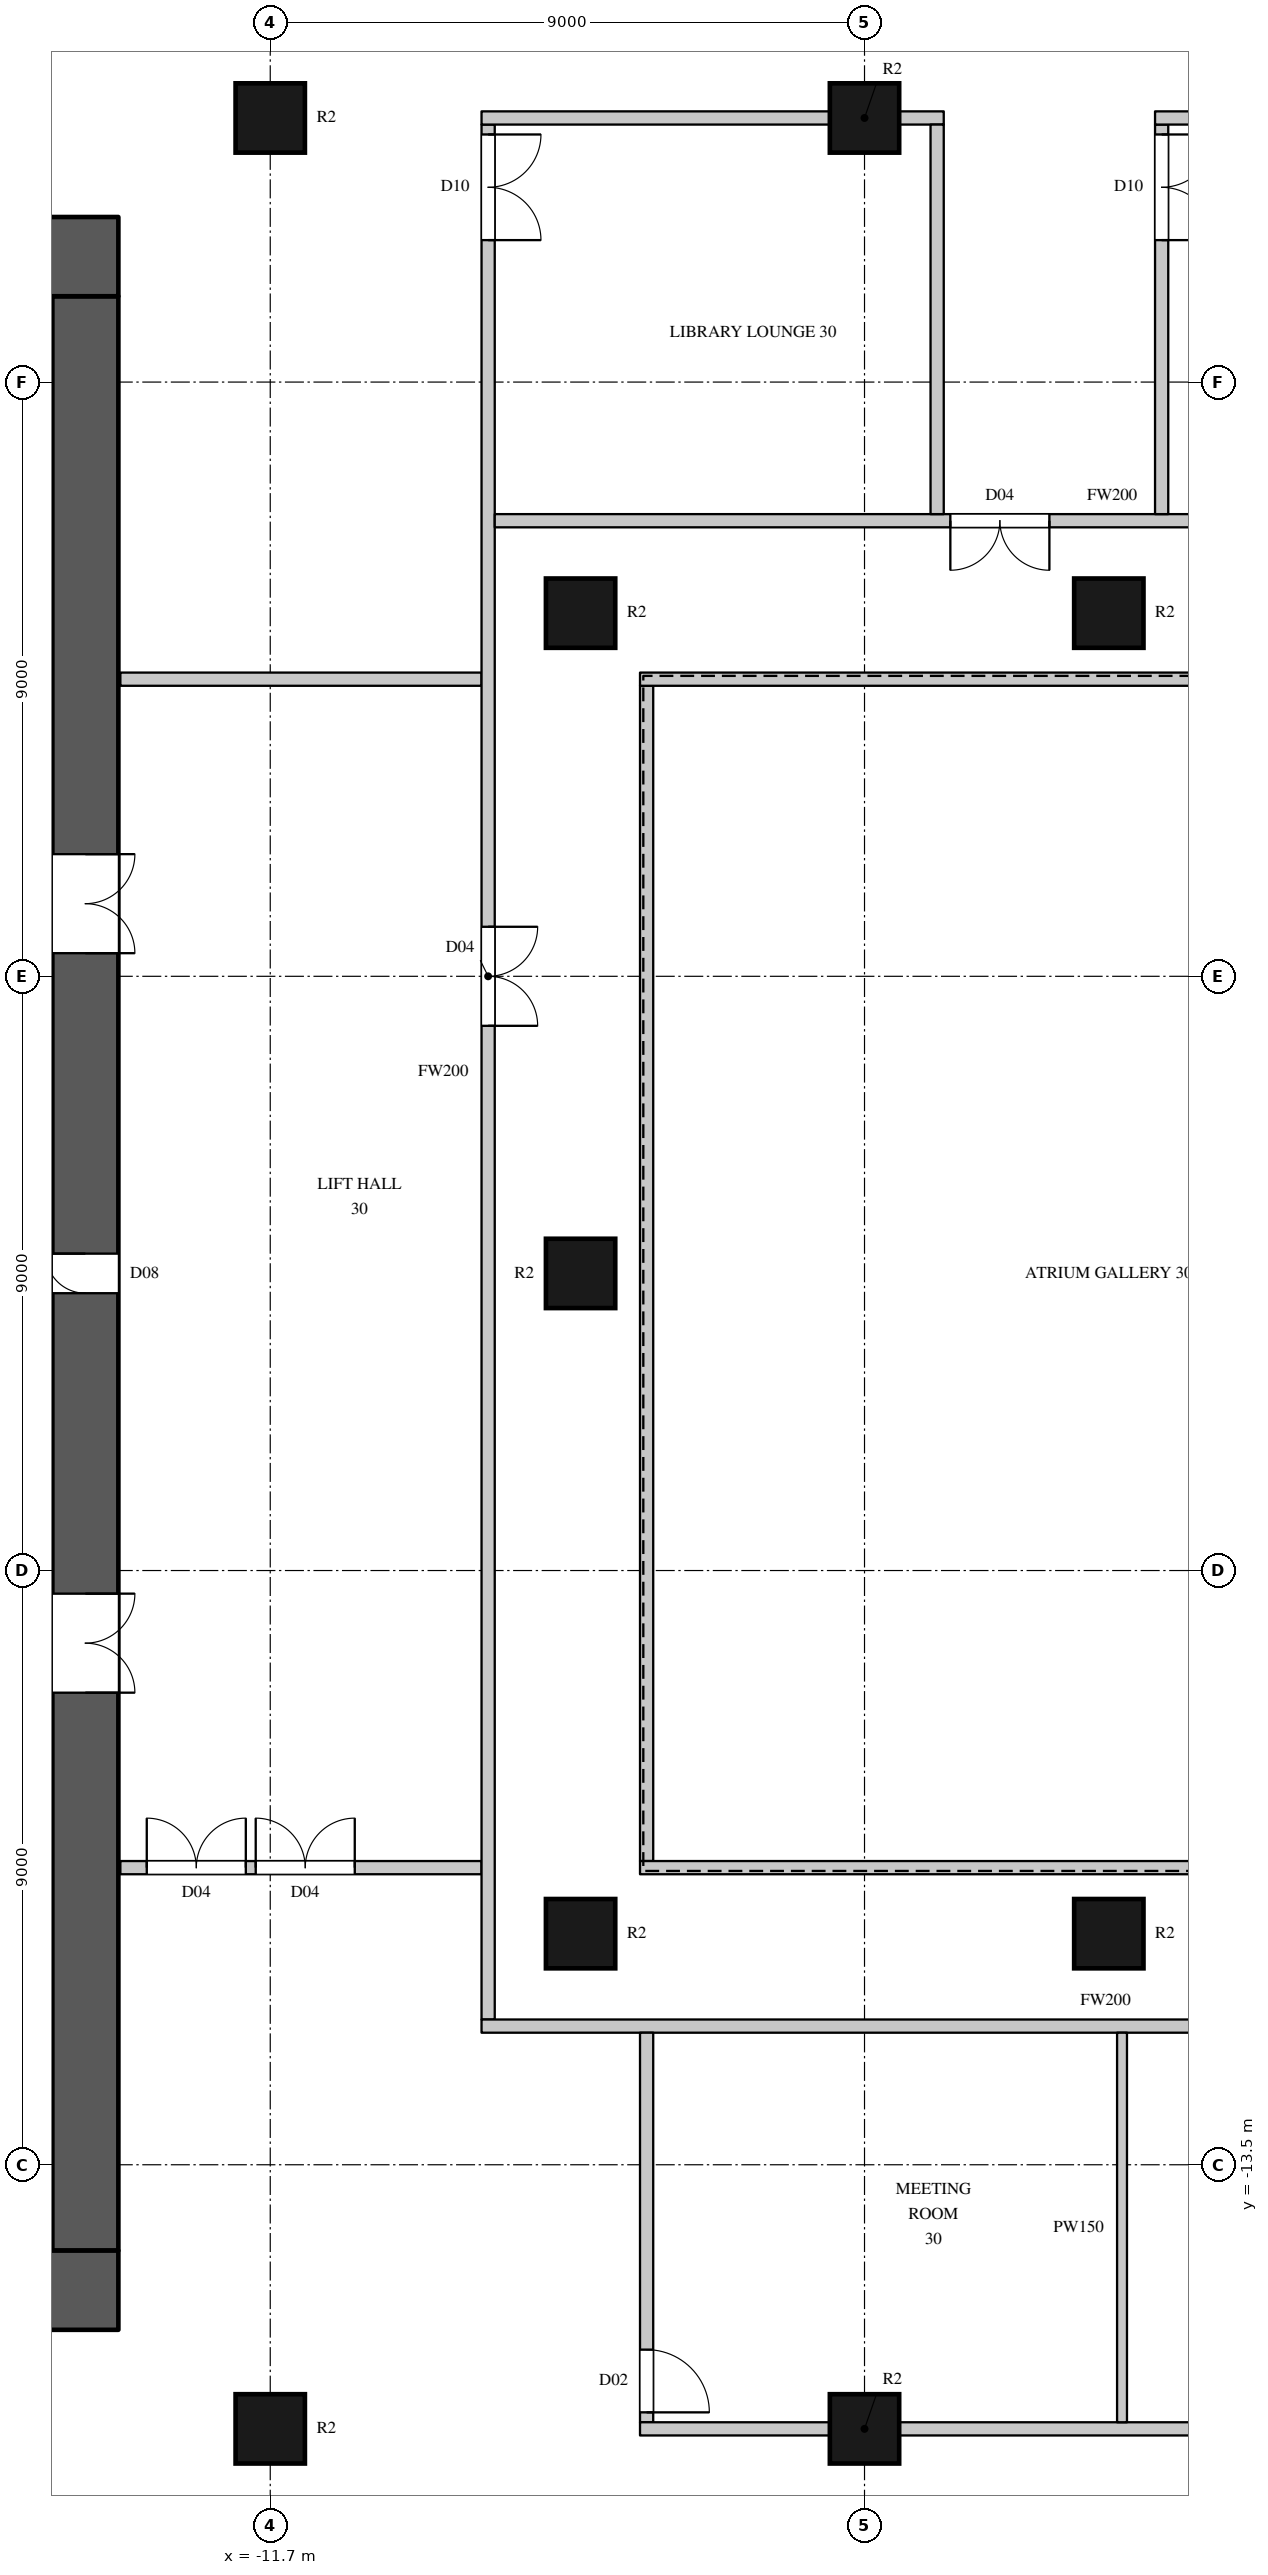
"""IFC4 building model, lengths in metres.
Left out: names, types, materials, properties, quantities, classifications, styles, units other than length and angle.
Written with IfcOpenShell. Run it as: python <this file> out.ifc"""

import sys

from ifc_helpers import new_model, si_unit, direction, frame, frame_2d, origin, origin_2d, place, context, subcontext, project, spatial, rectangle, circle, extrude, element, fill, save


model = new_model("IFC4")
c1 = context("Model", 3, precision=1e-05, world=origin(), true_north=direction((0.0, 1.0)))
c2 = subcontext(c1, "Body", "Model", "MODEL_VIEW")
j1 = project(units=[si_unit("LENGTHUNIT", "METRE"), si_unit("PLANEANGLEUNIT", "RADIAN")], contexts=[c1])
p1 = place(None, origin())
s1 = spatial("IfcSite", under=j1, at=p1, CompositionType="ELEMENT")
p2 = place(p1, origin())
s2 = spatial("IfcBuilding", under=s1, at=p2, CompositionType="ELEMENT")
p3 = place(p2, frame((0.0, 0.0, 138.3)))
s3 = spatial("IfcBuildingStorey", under=s2, at=p3, CompositionType="ELEMENT", Elevation=138.3)
for number, where, z_axis, x_axis in (
    (1, (-11.7, -17.5, 0.0), (0.0, 0.0, 1.0), (1.0, 0.0, 0.0)),
    (2, (-2.7, -17.5, 0.0), (0.0, 0.0, 1.0), (1.0, 0.0, 0.0)),
    (3, (-11.7, 17.5, 0.0), (0.0, 0.0, 1.0), (1.0, 0.0, 0.0)),
    (4, (-2.7, 17.5, 0.0), (0.0, 0.0, 1.0), (1.0, 0.0, 0.0)),
    (5, (-7.0, -10.0, 0.0), (0.0, 0.0, 1.0), (1.0, 0.0, 0.0)),
    (6, (-7.0, 0.0, 0.0), (0.0, 0.0, 1.0), (1.0, 0.0, 0.0)),
    (7, (-7.0, 10.0, 0.0), (0.0, 0.0, 1.0), (1.0, 0.0, 0.0)),
    (8, (1.0, -10.0, 0.0), (0.0, 0.0, 1.0), (1.0, 0.0, 0.0)),
    (9, (1.0, 10.0, 0.0), (0.0, 0.0, 1.0), (1.0, 0.0, 0.0)),
):
    element("IfcColumn", number, at=place(p3, frame(where, z_axis=z_axis, x_axis=x_axis)), inside=s3, PredefinedType="COLUMN", context=c2, shape_type="SweptSolid", body=[
        extrude(circle(Radius=0.525, at=origin_2d()), origin(), (0.0, 0.0, 1.0), 3.6),
    ])
p4 = place(p3, frame((-30.0, 15.4, 0.0), z_axis=(0.0, 0.0, 1.0), x_axis=(1.0, 0.0, 0.0)))
e10 = element("IfcWall", 10, at=p4, inside=s3, PredefinedType="SHEAR", context=c2, shape_type="SweptSolid", body=[
    extrude(rectangle(XDim=16.0, YDim=1.2, at=frame_2d((8.0, 0.0))), origin(), (0.0, 0.0, 1.0), 3.6),
])
p5 = place(p4, frame((13.4, 0.0, 0.0)))
e11 = element("IfcOpeningElement", 11, at=p5, cuts=e10, PredefinedType="OPENING", context=c2, shape_type="SweptSolid", body=[
    extrude(rectangle(XDim=1.5, YDim=2.4, at=frame_2d((0.75, 1.2))), frame((0.0, 0.61, 0.0), z_axis=(0.0, -1.0, 0.0), x_axis=(1.0, 0.0, 0.0)), (0.0, 0.0, 1.0), 1.22),
])
p6 = place(p3, frame((-30.0, -15.4, 0.0), z_axis=(0.0, 0.0, 1.0), x_axis=(1.0, 0.0, 0.0)))
e12 = element("IfcWall", 12, at=p6, inside=s3, PredefinedType="SHEAR", context=c2, shape_type="SweptSolid", body=[
    extrude(rectangle(XDim=16.0, YDim=1.2, at=frame_2d((8.0, 0.0))), origin(), (0.0, 0.0, 1.0), 3.6),
])
p7 = place(p6, frame((13.4, 0.0, 0.0)))
e13 = element("IfcOpeningElement", 13, at=p7, cuts=e12, PredefinedType="OPENING", context=c2, shape_type="SweptSolid", body=[
    extrude(rectangle(XDim=1.5, YDim=2.4, at=frame_2d((0.75, 1.2))), frame((0.0, 0.61, 0.0), z_axis=(0.0, -1.0, 0.0), x_axis=(1.0, 0.0, 0.0)), (0.0, 0.0, 1.0), 1.22),
])
p8 = place(p3, frame((-14.5, -14.8, 0.0), z_axis=(0.0, 0.0, 1.0), x_axis=(0.0, 1.0, 0.0)))
e14 = element("IfcWall", 14, at=p8, inside=s3, PredefinedType="SHEAR", context=c2, shape_type="SweptSolid", body=[
    extrude(rectangle(XDim=29.6, YDim=1.0, at=frame_2d((14.8, 0.0))), origin(), (0.0, 0.0, 1.0), 3.6),
])
p9 = place(p8, frame((8.45, 0.0, 0.0)))
e15 = element("IfcOpeningElement", 15, at=p9, cuts=e14, PredefinedType="OPENING", context=c2, shape_type="SweptSolid", body=[
    extrude(rectangle(XDim=1.5, YDim=2.4, at=frame_2d((0.75, 1.2))), frame((0.0, 0.51, 0.0), z_axis=(0.0, -1.0, 0.0), x_axis=(1.0, 0.0, 0.0)), (0.0, 0.0, 1.0), 1.02),
])
p10 = place(p8, frame((19.65, 0.0, 0.0)))
e16 = element("IfcOpeningElement", 16, at=p10, cuts=e14, PredefinedType="OPENING", context=c2, shape_type="SweptSolid", body=[
    extrude(rectangle(XDim=1.5, YDim=2.4, at=frame_2d((0.75, 1.2))), frame((0.0, 0.51, 0.0), z_axis=(0.0, -1.0, 0.0), x_axis=(1.0, 0.0, 0.0)), (0.0, 0.0, 1.0), 1.02),
])
p11 = place(p8, frame((14.5, 0.0, 0.0)))
e17 = element("IfcOpeningElement", 17, at=p11, cuts=e14, PredefinedType="OPENING", context=c2, shape_type="SweptSolid", body=[
    extrude(rectangle(XDim=0.6, YDim=2.0, at=frame_2d((0.3, 1.0))), frame((0.0, 0.51, 0.0), z_axis=(0.0, -1.0, 0.0), x_axis=(1.0, 0.0, 0.0)), (0.0, 0.0, 1.0), 1.02),
])
p12 = place(p3, frame((-13.97, -9.0, 0.0), z_axis=(0.0, 0.0, 1.0), x_axis=(1.0, 0.0, 0.0)))
e18 = element("IfcWall", 18, at=p12, inside=s3, PredefinedType="PARTITIONING", context=c2, shape_type="SweptSolid", body=[
    extrude(rectangle(XDim=5.47, YDim=0.2, at=frame_2d((2.735, 0.0))), origin(), (0.0, 0.0, 1.0), 3.3),
])
p13 = place(p12, frame((0.4, 0.0, 0.0)))
e19 = element("IfcOpeningElement", 19, at=p13, cuts=e18, PredefinedType="OPENING", context=c2, shape_type="SweptSolid", body=[
    extrude(rectangle(XDim=1.5, YDim=2.2, at=frame_2d((0.75, 1.1))), frame((0.0, 0.11, 0.0), z_axis=(0.0, -1.0, 0.0), x_axis=(1.0, 0.0, 0.0)), (0.0, 0.0, 1.0), 0.22),
])
p14 = place(p12, frame((2.05, 0.0, 0.0)))
e20 = element("IfcOpeningElement", 20, at=p14, cuts=e18, PredefinedType="OPENING", context=c2, shape_type="SweptSolid", body=[
    extrude(rectangle(XDim=1.5, YDim=2.2, at=frame_2d((0.75, 1.1))), frame((0.0, 0.11, 0.0), z_axis=(0.0, -1.0, 0.0), x_axis=(1.0, 0.0, 0.0)), (0.0, 0.0, 1.0), 0.22),
])
p15 = place(p3, frame((-13.97, 9.0, 0.0), z_axis=(0.0, 0.0, 1.0), x_axis=(1.0, 0.0, 0.0)))
e21 = element("IfcWall", 21, at=p15, inside=s3, PredefinedType="PARTITIONING", context=c2, shape_type="SweptSolid", body=[
    extrude(rectangle(XDim=5.47, YDim=0.2, at=frame_2d((2.735, 0.0))), origin(), (0.0, 0.0, 1.0), 3.3),
])
p16 = place(p3, frame((-8.4, -11.3, 0.0), z_axis=(0.0, 0.0, 1.0), x_axis=(0.0, 1.0, 0.0)))
e22 = element("IfcWall", 22, at=p16, inside=s3, PredefinedType="PARTITIONING", context=c2, shape_type="SweptSolid", body=[
    extrude(rectangle(XDim=28.7, YDim=0.2, at=frame_2d((14.35, 0.0))), origin(), (0.0, 0.0, 1.0), 3.3),
])
p17 = place(p16, frame((15.05, 0.0, 0.0)))
e23 = element("IfcOpeningElement", 23, at=p17, cuts=e22, PredefinedType="OPENING", context=c2, shape_type="SweptSolid", body=[
    extrude(rectangle(XDim=1.5, YDim=2.2, at=frame_2d((0.75, 1.1))), frame((0.0, 0.11, 0.0), z_axis=(0.0, -1.0, 0.0), x_axis=(1.0, 0.0, 0.0)), (0.0, 0.0, 1.0), 0.22),
])
p18 = place(p16, frame((26.95, 0.0, 0.0)))
e24 = element("IfcOpeningElement", 24, at=p18, cuts=e22, PredefinedType="OPENING", context=c2, shape_type="SweptSolid", body=[
    extrude(rectangle(XDim=1.6, YDim=2.4, at=frame_2d((0.8, 1.2))), frame((0.0, 0.11, 0.0), z_axis=(0.0, -1.0, 0.0), x_axis=(1.0, 0.0, 0.0)), (0.0, 0.0, 1.0), 0.22),
])
p19 = place(p3, frame((-8.5, -11.4, 0.0), z_axis=(0.0, 0.0, 1.0), x_axis=(1.0, 0.0, 0.0)))
e25 = element("IfcWall", 25, at=p19, inside=s3, PredefinedType="PARTITIONING", context=c2, shape_type="SweptSolid", body=[
    extrude(rectangle(XDim=18.9, YDim=0.2, at=frame_2d((9.45, 0.0))), origin(), (0.0, 0.0, 1.0), 3.3),
])
p20 = place(p3, frame((-8.3, 11.4, 0.0), z_axis=(0.0, 0.0, 1.0), x_axis=(1.0, 0.0, 0.0)))
e26 = element("IfcWall", 26, at=p20, inside=s3, PredefinedType="PARTITIONING", context=c2, shape_type="SweptSolid", body=[
    extrude(rectangle(XDim=18.7, YDim=0.2, at=frame_2d((9.35, 0.0))), origin(), (0.0, 0.0, 1.0), 3.3),
])
p21 = place(p20, frame((6.9, 0.0, 0.0)))
e27 = element("IfcOpeningElement", 27, at=p21, cuts=e26, PredefinedType="OPENING", context=c2, shape_type="SweptSolid", body=[
    extrude(rectangle(XDim=1.5, YDim=2.2, at=frame_2d((0.75, 1.1))), frame((0.0, 0.11, 0.0), z_axis=(0.0, -1.0, 0.0), x_axis=(1.0, 0.0, 0.0)), (0.0, 0.0, 1.0), 0.22),
])
p22 = place(p3, frame((-8.5, 17.5, 0.0), z_axis=(0.0, 0.0, 1.0), x_axis=(1.0, 0.0, 0.0)))
e28 = element("IfcWall", 28, at=p22, inside=s3, PredefinedType="PARTITIONING", context=c2, shape_type="SweptSolid", body=[
    extrude(rectangle(XDim=5.275, YDim=0.2, at=frame_2d((2.637, 0.0))), origin(), (0.0, 0.0, 1.0), 2.75),
])
p23 = place(p3, frame((-2.175, 17.5, 0.0), z_axis=(0.0, 0.0, 1.0), x_axis=(1.0, 0.0, 0.0)))
e29 = element("IfcWall", 29, at=p23, inside=s3, PredefinedType="PARTITIONING", context=c2, shape_type="SweptSolid", body=[
    extrude(rectangle(XDim=0.675, YDim=0.2, at=frame_2d((0.337, 0.0))), origin(), (0.0, 0.0, 1.0), 2.75),
])
p24 = place(p3, frame((-6.0, -17.4, 0.0), z_axis=(0.0, 0.0, 1.0), x_axis=(0.0, 1.0, 0.0)))
e30 = element("IfcWall", 30, at=p24, inside=s3, PredefinedType="PARTITIONING", context=c2, shape_type="SweptSolid", body=[
    extrude(rectangle(XDim=5.9, YDim=0.2, at=frame_2d((2.95, 0.0))), origin(), (0.0, 0.0, 1.0), 3.3),
])
p25 = place(p24, frame((0.15, 0.0, 0.0)))
e31 = element("IfcOpeningElement", 31, at=p25, cuts=e30, PredefinedType="OPENING", context=c2, shape_type="SweptSolid", body=[
    extrude(rectangle(XDim=0.95, YDim=2.2, at=frame_2d((0.475, 1.1))), frame((0.0, 0.11, 0.0), z_axis=(0.0, -1.0, 0.0), x_axis=(1.0, 0.0, 0.0)), (0.0, 0.0, 1.0), 0.22),
])
p26 = place(p3, frame((-6.1, -17.5, 0.0), z_axis=(0.0, 0.0, 1.0), x_axis=(1.0, 0.0, 0.0)))
e32 = element("IfcWall", 32, at=p26, inside=s3, PredefinedType="PARTITIONING", context=c2, shape_type="SweptSolid", body=[
    extrude(rectangle(XDim=2.875, YDim=0.2, at=frame_2d((1.438, 0.0))), origin(), (0.0, 0.0, 1.0), 2.75),
])
p27 = place(p3, frame((-2.175, -17.5, 0.0), z_axis=(0.0, 0.0, 1.0), x_axis=(1.0, 0.0, 0.0)))
e33 = element("IfcWall", 33, at=p27, inside=s3, PredefinedType="PARTITIONING", context=c2, shape_type="SweptSolid", body=[
    extrude(rectangle(XDim=7.95, YDim=0.2, at=frame_2d((3.975, 0.0))), origin(), (0.0, 0.0, 1.0), 2.75),
])
p28 = place(p27, frame((5.0, 0.0, 0.0)))
e34 = element("IfcOpeningElement", 34, at=p28, cuts=e33, PredefinedType="OPENING", context=c2, shape_type="SweptSolid", body=[
    extrude(rectangle(XDim=0.95, YDim=2.2, at=frame_2d((0.475, 1.1))), frame((0.0, 0.11, 0.0), z_axis=(0.0, -1.0, 0.0), x_axis=(1.0, 0.0, 0.0)), (0.0, 0.0, 1.0), 0.22),
])
p29 = place(p3, frame((-6.0, -8.9, 0.0), z_axis=(0.0, 0.0, 1.0), x_axis=(0.0, 1.0, 0.0)))
e35 = element("IfcWall", 35, at=p29, inside=s3, PredefinedType="PARTITIONING", context=c2, shape_type="SweptSolid", body=[
    extrude(rectangle(XDim=17.8, YDim=0.2, at=frame_2d((8.9, 0.0))), origin(), (0.0, 0.0, 1.0), 3.3),
])
for number, where, z_axis, x_axis in (
    (36, (-6.1, -9.0, 0.0), (0.0, 0.0, 1.0), (1.0, 0.0, 0.0)),
    (37, (-6.1, 9.0, 0.0), (0.0, 0.0, 1.0), (1.0, 0.0, 0.0)),
):
    element("IfcWall", number, at=place(p3, frame(where, z_axis=z_axis, x_axis=x_axis)), inside=s3, PredefinedType="PARTITIONING", context=c2, shape_type="SweptSolid", body=[
        extrude(rectangle(XDim=14.2, YDim=0.2, at=frame_2d((7.1, 0.0))), origin(), (0.0, 0.0, 1.0), 3.3),
    ])
p30 = place(p3, frame((-1.6, 11.5, 0.0), z_axis=(0.0, 0.0, 1.0), x_axis=(0.0, 1.0, 0.0)))
e38 = element("IfcWall", 38, at=p30, inside=s3, PredefinedType="PARTITIONING", context=c2, shape_type="SweptSolid", body=[
    extrude(rectangle(XDim=5.9, YDim=0.2, at=frame_2d((2.95, 0.0))), origin(), (0.0, 0.0, 1.0), 3.3),
])
p31 = place(p3, frame((1.8, 11.5, 0.0), z_axis=(0.0, 0.0, 1.0), x_axis=(0.0, 1.0, 0.0)))
e39 = element("IfcWall", 39, at=p31, inside=s3, PredefinedType="PARTITIONING", context=c2, shape_type="SweptSolid", body=[
    extrude(rectangle(XDim=5.9, YDim=0.2, at=frame_2d((2.95, 0.0))), origin(), (0.0, 0.0, 1.0), 3.3),
])
p32 = place(p31, frame((4.15, 0.0, 0.0)))
e40 = element("IfcOpeningElement", 40, at=p32, cuts=e39, PredefinedType="OPENING", context=c2, shape_type="SweptSolid", body=[
    extrude(rectangle(XDim=1.6, YDim=2.4, at=frame_2d((0.8, 1.2))), frame((0.0, 0.11, 0.0), z_axis=(0.0, -1.0, 0.0), x_axis=(1.0, 0.0, 0.0)), (0.0, 0.0, 1.0), 0.22),
])
p33 = place(p3, frame((1.7, 17.5, 0.0), z_axis=(0.0, 0.0, 1.0), x_axis=(1.0, 0.0, 0.0)))
e41 = element("IfcWall", 41, at=p33, inside=s3, PredefinedType="PARTITIONING", context=c2, shape_type="SweptSolid", body=[
    extrude(rectangle(XDim=4.075, YDim=0.2, at=frame_2d((2.038, 0.0))), origin(), (0.0, 0.0, 1.0), 2.75),
])
p34 = place(p3, frame((1.2, -17.4, 0.0), z_axis=(0.0, 0.0, 1.0), x_axis=(0.0, 1.0, 0.0)))
e42 = element("IfcWall", 42, at=p34, inside=s3, PredefinedType="PARTITIONING", context=c2, shape_type="SweptSolid", body=[
    extrude(rectangle(XDim=5.9, YDim=0.15, at=frame_2d((2.95, 0.0))), origin(), (0.0, 0.0, 1.0), 3.3),
])
p35 = place(p17, origin())
e43 = element("IfcDoor", 43, at=p35, inside=s3, OperationType="DOUBLE_DOOR_SINGLE_SWING", PredefinedType="DOOR", context=c2, shape_type="SweptSolid", body=[
    extrude(rectangle(XDim=1.5, YDim=2.2, at=frame_2d((0.75, 1.1))), frame((0.0, 0.025, 0.0), z_axis=(0.0, -1.0, 0.0), x_axis=(1.0, 0.0, 0.0)), (0.0, 0.0, 1.0), 0.05),
])
fill(e23, e43)
p36 = place(p13, origin())
e44 = element("IfcDoor", 44, at=p36, inside=s3, OperationType="DOUBLE_DOOR_SINGLE_SWING", PredefinedType="DOOR", context=c2, shape_type="SweptSolid", body=[
    extrude(rectangle(XDim=1.5, YDim=2.2, at=frame_2d((0.75, 1.1))), frame((0.0, 0.025, 0.0), z_axis=(0.0, -1.0, 0.0), x_axis=(1.0, 0.0, 0.0)), (0.0, 0.0, 1.0), 0.05),
])
fill(e19, e44)
p37 = place(p14, origin())
e45 = element("IfcDoor", 45, at=p37, inside=s3, OperationType="DOUBLE_DOOR_SINGLE_SWING", PredefinedType="DOOR", context=c2, shape_type="SweptSolid", body=[
    extrude(rectangle(XDim=1.5, YDim=2.2, at=frame_2d((0.75, 1.1))), frame((0.0, 0.025, 0.0), z_axis=(0.0, -1.0, 0.0), x_axis=(1.0, 0.0, 0.0)), (0.0, 0.0, 1.0), 0.05),
])
fill(e20, e45)
p38 = place(p21, origin())
e46 = element("IfcDoor", 46, at=p38, inside=s3, OperationType="DOUBLE_DOOR_SINGLE_SWING", PredefinedType="DOOR", context=c2, shape_type="SweptSolid", body=[
    extrude(rectangle(XDim=1.5, YDim=2.2, at=frame_2d((0.75, 1.1))), frame((0.0, 0.025, 0.0), z_axis=(0.0, -1.0, 0.0), x_axis=(1.0, 0.0, 0.0)), (0.0, 0.0, 1.0), 0.05),
])
fill(e27, e46)
p39 = place(p18, origin())
e47 = element("IfcDoor", 47, at=p39, inside=s3, OperationType="DOUBLE_DOOR_SINGLE_SWING", PredefinedType="DOOR", context=c2, shape_type="SweptSolid", body=[
    extrude(rectangle(XDim=1.6, YDim=2.4, at=frame_2d((0.8, 1.2))), frame((0.0, 0.025, 0.0), z_axis=(0.0, -1.0, 0.0), x_axis=(1.0, 0.0, 0.0)), (0.0, 0.0, 1.0), 0.05),
])
fill(e24, e47)
p40 = place(p32, origin())
e48 = element("IfcDoor", 48, at=p40, inside=s3, OperationType="DOUBLE_DOOR_SINGLE_SWING", PredefinedType="DOOR", context=c2, shape_type="SweptSolid", body=[
    extrude(rectangle(XDim=1.6, YDim=2.4, at=frame_2d((0.8, 1.2))), frame((0.0, 0.025, 0.0), z_axis=(0.0, -1.0, 0.0), x_axis=(1.0, 0.0, 0.0)), (0.0, 0.0, 1.0), 0.05),
])
fill(e40, e48)
p41 = place(p25, origin())
e49 = element("IfcDoor", 49, at=p41, inside=s3, OperationType="SINGLE_SWING_RIGHT", PredefinedType="DOOR", context=c2, shape_type="SweptSolid", body=[
    extrude(rectangle(XDim=0.95, YDim=2.2, at=frame_2d((0.475, 1.1))), frame((0.0, 0.025, 0.0), z_axis=(0.0, -1.0, 0.0), x_axis=(1.0, 0.0, 0.0)), (0.0, 0.0, 1.0), 0.05),
])
fill(e31, e49)
p42 = place(p9, origin())
e50 = element("IfcDoor", 50, at=p42, inside=s3, OperationType="DOUBLE_DOOR_SINGLE_SWING", PredefinedType="DOOR", context=c2, shape_type="SweptSolid", body=[
    extrude(rectangle(XDim=1.5, YDim=2.4, at=frame_2d((0.75, 1.2))), frame((0.0, -0.445, 0.0), z_axis=(0.0, -1.0, 0.0), x_axis=(1.0, 0.0, 0.0)), (0.0, 0.0, 1.0), 0.05),
])
fill(e15, e50)
p43 = place(p10, origin())
e51 = element("IfcDoor", 51, at=p43, inside=s3, OperationType="DOUBLE_DOOR_SINGLE_SWING", PredefinedType="DOOR", context=c2, shape_type="SweptSolid", body=[
    extrude(rectangle(XDim=1.5, YDim=2.4, at=frame_2d((0.75, 1.2))), frame((0.0, -0.445, 0.0), z_axis=(0.0, -1.0, 0.0), x_axis=(1.0, 0.0, 0.0)), (0.0, 0.0, 1.0), 0.05),
])
fill(e16, e51)
p44 = place(p11, origin())
e52 = element("IfcDoor", 52, at=p44, inside=s3, OperationType="SINGLE_SWING_RIGHT", PredefinedType="DOOR", context=c2, shape_type="SweptSolid", body=[
    extrude(rectangle(XDim=0.6, YDim=2.0, at=frame_2d((0.3, 1.0))), frame((0.0, 0.495, 0.0), z_axis=(0.0, -1.0, 0.0), x_axis=(1.0, 0.0, 0.0)), (0.0, 0.0, 1.0), 0.05),
])
fill(e17, e52)
save(model, sys.argv[1])
